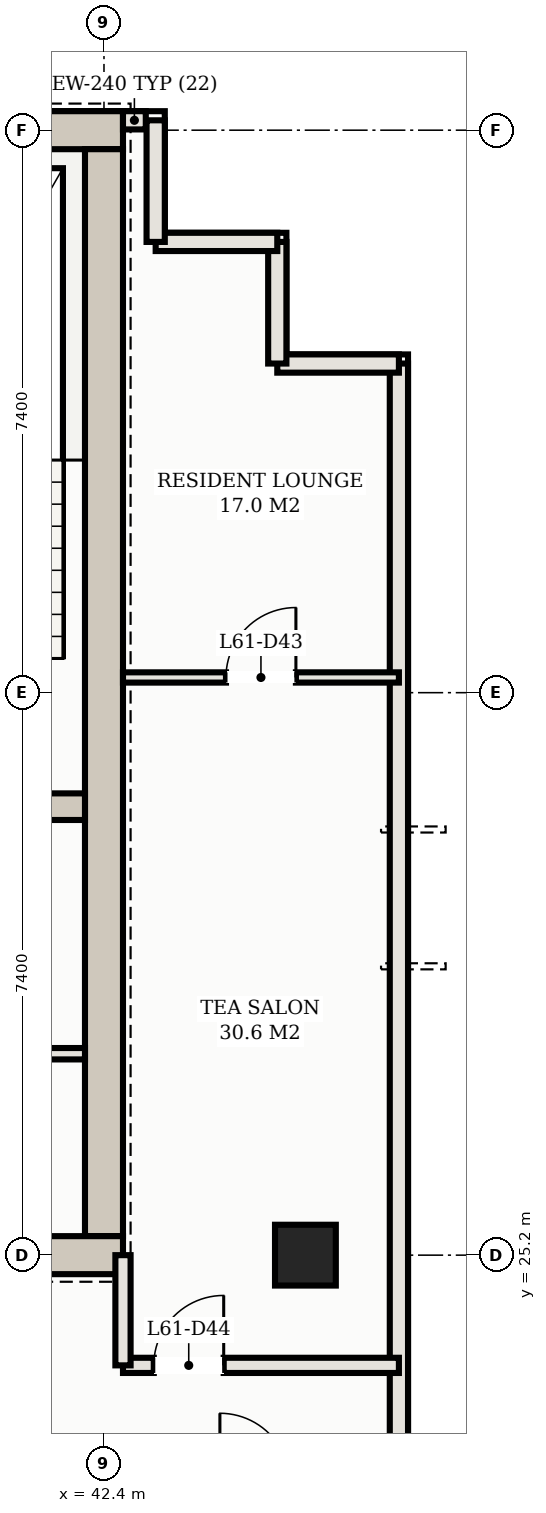
"""IFC4 building model, lengths in metres.
Left out: names, types, materials, properties, quantities, classifications, styles, units other than length and angle.
Written with IfcOpenShell. Run it as: python <this file> out.ifc"""

import sys

from ifc_helpers import new_model, si_unit, direction, frame, frame_2d, origin, origin_2d, place, context, subcontext, project, spatial, rectangle, hollow_rectangle, extrude, element, fill, save


model = new_model("IFC4")
c1 = context("Model", 3, precision=1e-05, world=origin(), true_north=direction((0.0, 1.0)))
c2 = subcontext(c1, "Body", "Model", "MODEL_VIEW")
j1 = project(units=[si_unit("LENGTHUNIT", "METRE"), si_unit("PLANEANGLEUNIT", "RADIAN")], contexts=[c1])
p1 = place(None, origin())
s1 = spatial("IfcSite", under=j1, at=p1, CompositionType="ELEMENT")
p2 = place(p1, origin())
s2 = spatial("IfcBuilding", under=s1, at=p2, CompositionType="ELEMENT")
p3 = place(p2, frame((0.0, 0.0, 223.1)))
s3 = spatial("IfcBuildingStorey", under=s2, at=p3, CompositionType="ELEMENT", Elevation=223.1)
p4 = place(p3, frame((10.35, 40.0, 0.0), z_axis=(0.0, 0.0, 1.0), x_axis=(1.0, 0.0, 0.0)))
e1 = element("IfcWall", 1, at=p4, inside=s3, PredefinedType="SHEAR", context=c2, shape_type="SweptSolid", body=[
    extrude(rectangle(XDim=32.3, YDim=0.5, at=frame_2d((16.15, 0.0))), origin(), (0.0, 0.0, 1.0), 3.11),
])
p5 = place(p3, frame((42.4, 25.45, 0.0), z_axis=(0.0, 0.0, 1.0), x_axis=(0.0, 1.0, 0.0)))
e2 = element("IfcWall", 2, at=p5, inside=s3, PredefinedType="SHEAR", context=c2, shape_type="SweptSolid", body=[
    extrude(rectangle(XDim=14.3, YDim=0.5, at=frame_2d((7.15, 0.0))), origin(), (0.0, 0.0, 1.0), 3.11),
])
p6 = place(p3, frame((34.6, 25.2, 0.0), z_axis=(0.0, 0.0, 1.0), x_axis=(1.0, 0.0, 0.0)))
e3 = element("IfcWall", 3, at=p6, inside=s3, PredefinedType="SHEAR", context=c2, shape_type="SweptSolid", body=[
    extrude(rectangle(XDim=8.05, YDim=0.5, at=frame_2d((4.025, 0.0))), origin(), (0.0, 0.0, 1.0), 3.11),
])
p7 = place(p6, frame((0.65, 0.0, 0.0)))
e4 = element("IfcOpeningElement", 4, at=p7, cuts=e3, PredefinedType="OPENING", context=c2, shape_type="SweptSolid", body=[
    extrude(rectangle(XDim=1.25, YDim=2.2, at=frame_2d((0.625, 1.1))), frame((0.0, 0.26, 0.0), z_axis=(0.0, -1.0, 0.0), x_axis=(1.0, 0.0, 0.0)), (0.0, 0.0, 1.0), 0.52),
])
p8 = place(p3, frame((38.075, 31.1, 0.0), z_axis=(0.0, 0.0, 1.0), x_axis=(1.0, 0.0, 0.0)))
e5 = element("IfcWall", 5, at=p8, inside=s3, PredefinedType="SHEAR", context=c2, shape_type="SweptSolid", body=[
    extrude(rectangle(XDim=4.075, YDim=0.35, at=frame_2d((2.038, 0.0))), origin(), (0.0, 0.0, 1.0), 3.11),
])
p9 = place(p3, frame((45.05, 25.2, 0.0), z_axis=(0.0, 0.0, 1.0), x_axis=(1.0, 0.0, 0.0)))
e6 = element("IfcColumn", 6, at=p9, inside=s3, PredefinedType="COLUMN", context=c2, shape_type="SweptSolid", body=[
    extrude(hollow_rectangle(XDim=0.8, YDim=0.8, WallThickness=0.028, at=origin_2d()), origin(), (0.0, 0.0, 1.0), 3.3),
])
p10 = place(p3, frame((46.28, 10.52, 0.0), z_axis=(0.0, 0.0, 1.0), x_axis=(0.0, 1.0, 0.0)))
e7 = element("IfcWall", 7, at=p10, inside=s3, PredefinedType="SOLIDWALL", context=c2, shape_type="SweptSolid", body=[
    extrude(rectangle(XDim=26.41, YDim=0.24, at=frame_2d((13.205, 0.0))), origin(), (0.0, 0.0, 1.0), 3.11),
])
p11 = place(p10, frame((6.48, 0.0, 0.0)))
e8 = element("IfcOpeningElement", 8, at=p11, cuts=e7, PredefinedType="OPENING", context=c2, shape_type="SweptSolid", body=[
    extrude(rectangle(XDim=1.8, YDim=2.2, at=frame_2d((0.9, 1.1))), frame((0.0, 0.13, 0.0), z_axis=(0.0, -1.0, 0.0), x_axis=(1.0, 0.0, 0.0)), (0.0, 0.0, 1.0), 0.26),
])
for number, where, z_axis, x_axis in (
    (9, (46.28, 36.93, 0.0), (0.0, 0.0, 1.0), (-1.0, 0.0, 0.0)),
    (10, (44.68, 36.93, 0.0), (0.0, 0.0, 1.0), (0.0, 1.0, 0.0)),
):
    element("IfcWall", number, at=place(p3, frame(where, z_axis=z_axis, x_axis=x_axis)), inside=s3, PredefinedType="SOLIDWALL", context=c2, shape_type="SweptSolid", body=[
        extrude(rectangle(XDim=1.6, YDim=0.24, at=frame_2d((0.8, 0.0))), origin(), (0.0, 0.0, 1.0), 3.11),
    ])
for number, where, z_axis, x_axis in (
    (11, (44.68, 38.53, 0.0), (0.0, 0.0, 1.0), (-1.0, 0.0, 0.0)),
    (12, (43.08, 38.53, 0.0), (0.0, 0.0, 1.0), (0.0, 1.0, 0.0)),
):
    element("IfcWall", number, at=place(p3, frame(where, z_axis=z_axis, x_axis=x_axis)), inside=s3, PredefinedType="SOLIDWALL", context=c2, shape_type="SweptSolid", body=[
        extrude(rectangle(XDim=1.6, YDim=0.24, at=frame_2d((0.8, 0.0))), origin(), (0.0, 0.0, 1.0), 3.11),
    ])
p12 = place(p3, frame((42.95, 40.13, 0.0), z_axis=(0.0, 0.0, 1.0), x_axis=(-1.0, 0.0, 0.0)))
e13 = element("IfcWall", 13, at=p12, inside=s3, PredefinedType="SOLIDWALL", context=c2, shape_type="SweptSolid", body=[
    extrude(rectangle(XDim=0.3, YDim=0.24, at=frame_2d((0.15, 0.0))), origin(), (0.0, 0.0, 1.0), 3.11),
])
p13 = place(p3, frame((37.15, 27.85, 0.0), z_axis=(0.0, 0.0, 1.0), x_axis=(1.0, 0.0, 0.0)))
e14 = element("IfcWall", 14, at=p13, inside=s3, PredefinedType="PARTITIONING", context=c2, shape_type="SweptSolid", body=[
    extrude(rectangle(XDim=5.0, YDim=0.15, at=frame_2d((2.5, 0.0))), origin(), (0.0, 0.0, 1.0), 2.43),
])
p14 = place(p3, frame((42.65, 23.75, 0.0), z_axis=(0.0, 0.0, 1.0), x_axis=(1.0, 0.0, 0.0)))
e15 = element("IfcWall", 15, at=p14, inside=s3, PredefinedType="PARTITIONING", context=c2, shape_type="SweptSolid", body=[
    extrude(rectangle(XDim=3.63, YDim=0.2, at=frame_2d((1.815, 0.0))), origin(), (0.0, 0.0, 1.0), 2.43),
])
p15 = place(p14, frame((0.405, 0.0, 0.0)))
e16 = element("IfcOpeningElement", 16, at=p15, cuts=e15, PredefinedType="OPENING", context=c2, shape_type="SweptSolid", body=[
    extrude(rectangle(XDim=0.92, YDim=2.15, at=frame_2d((0.46, 1.075))), frame((0.0, 0.11, 0.0), z_axis=(0.0, -1.0, 0.0), x_axis=(1.0, 0.0, 0.0)), (0.0, 0.0, 1.0), 0.22),
])
p16 = place(p3, frame((42.65, 23.75, 0.0), z_axis=(0.0, 0.0, 1.0), x_axis=(0.0, 1.0, 0.0)))
e17 = element("IfcWall", 17, at=p16, inside=s3, PredefinedType="PARTITIONING", context=c2, shape_type="SweptSolid", body=[
    extrude(rectangle(XDim=1.45, YDim=0.2, at=frame_2d((0.725, 0.0))), origin(), (0.0, 0.0, 1.0), 2.43),
])
p17 = place(p3, frame((42.65, 32.8, 0.0), z_axis=(0.0, 0.0, 1.0), x_axis=(1.0, 0.0, 0.0)))
e18 = element("IfcWall", 18, at=p17, inside=s3, PredefinedType="PARTITIONING", context=c2, shape_type="SweptSolid", body=[
    extrude(rectangle(XDim=3.63, YDim=0.135, at=frame_2d((1.815, 0.0))), origin(), (0.0, 0.0, 1.0), 2.43),
])
p18 = place(p17, frame((1.355, 0.0, 0.0)))
e19 = element("IfcOpeningElement", 19, at=p18, cuts=e18, PredefinedType="OPENING", context=c2, shape_type="SweptSolid", body=[
    extrude(rectangle(XDim=0.92, YDim=2.15, at=frame_2d((0.46, 1.075))), frame((0.0, 0.078, 0.0), z_axis=(0.0, -1.0, 0.0), x_axis=(1.0, 0.0, 0.0)), (0.0, 0.0, 1.0), 0.155),
])
p19 = place(p18, origin())
e20 = element("IfcDoor", 20, at=p19, inside=s3, OperationType="SINGLE_SWING_RIGHT", PredefinedType="DOOR", context=c2, shape_type="SweptSolid", body=[
    extrude(rectangle(XDim=0.92, YDim=2.15, at=frame_2d((0.46, 1.075))), frame((0.0, 0.025, 0.0), z_axis=(0.0, -1.0, 0.0), x_axis=(1.0, 0.0, 0.0)), (0.0, 0.0, 1.0), 0.05),
])
fill(e19, e20)
p20 = place(p15, origin())
e21 = element("IfcDoor", 21, at=p20, inside=s3, OperationType="SINGLE_SWING_RIGHT", PredefinedType="DOOR", context=c2, shape_type="SweptSolid", body=[
    extrude(rectangle(XDim=0.92, YDim=2.15, at=frame_2d((0.46, 1.075))), frame((0.0, 0.025, 0.0), z_axis=(0.0, -1.0, 0.0), x_axis=(1.0, 0.0, 0.0)), (0.0, 0.0, 1.0), 0.05),
])
fill(e16, e21)
save(model, sys.argv[1])
